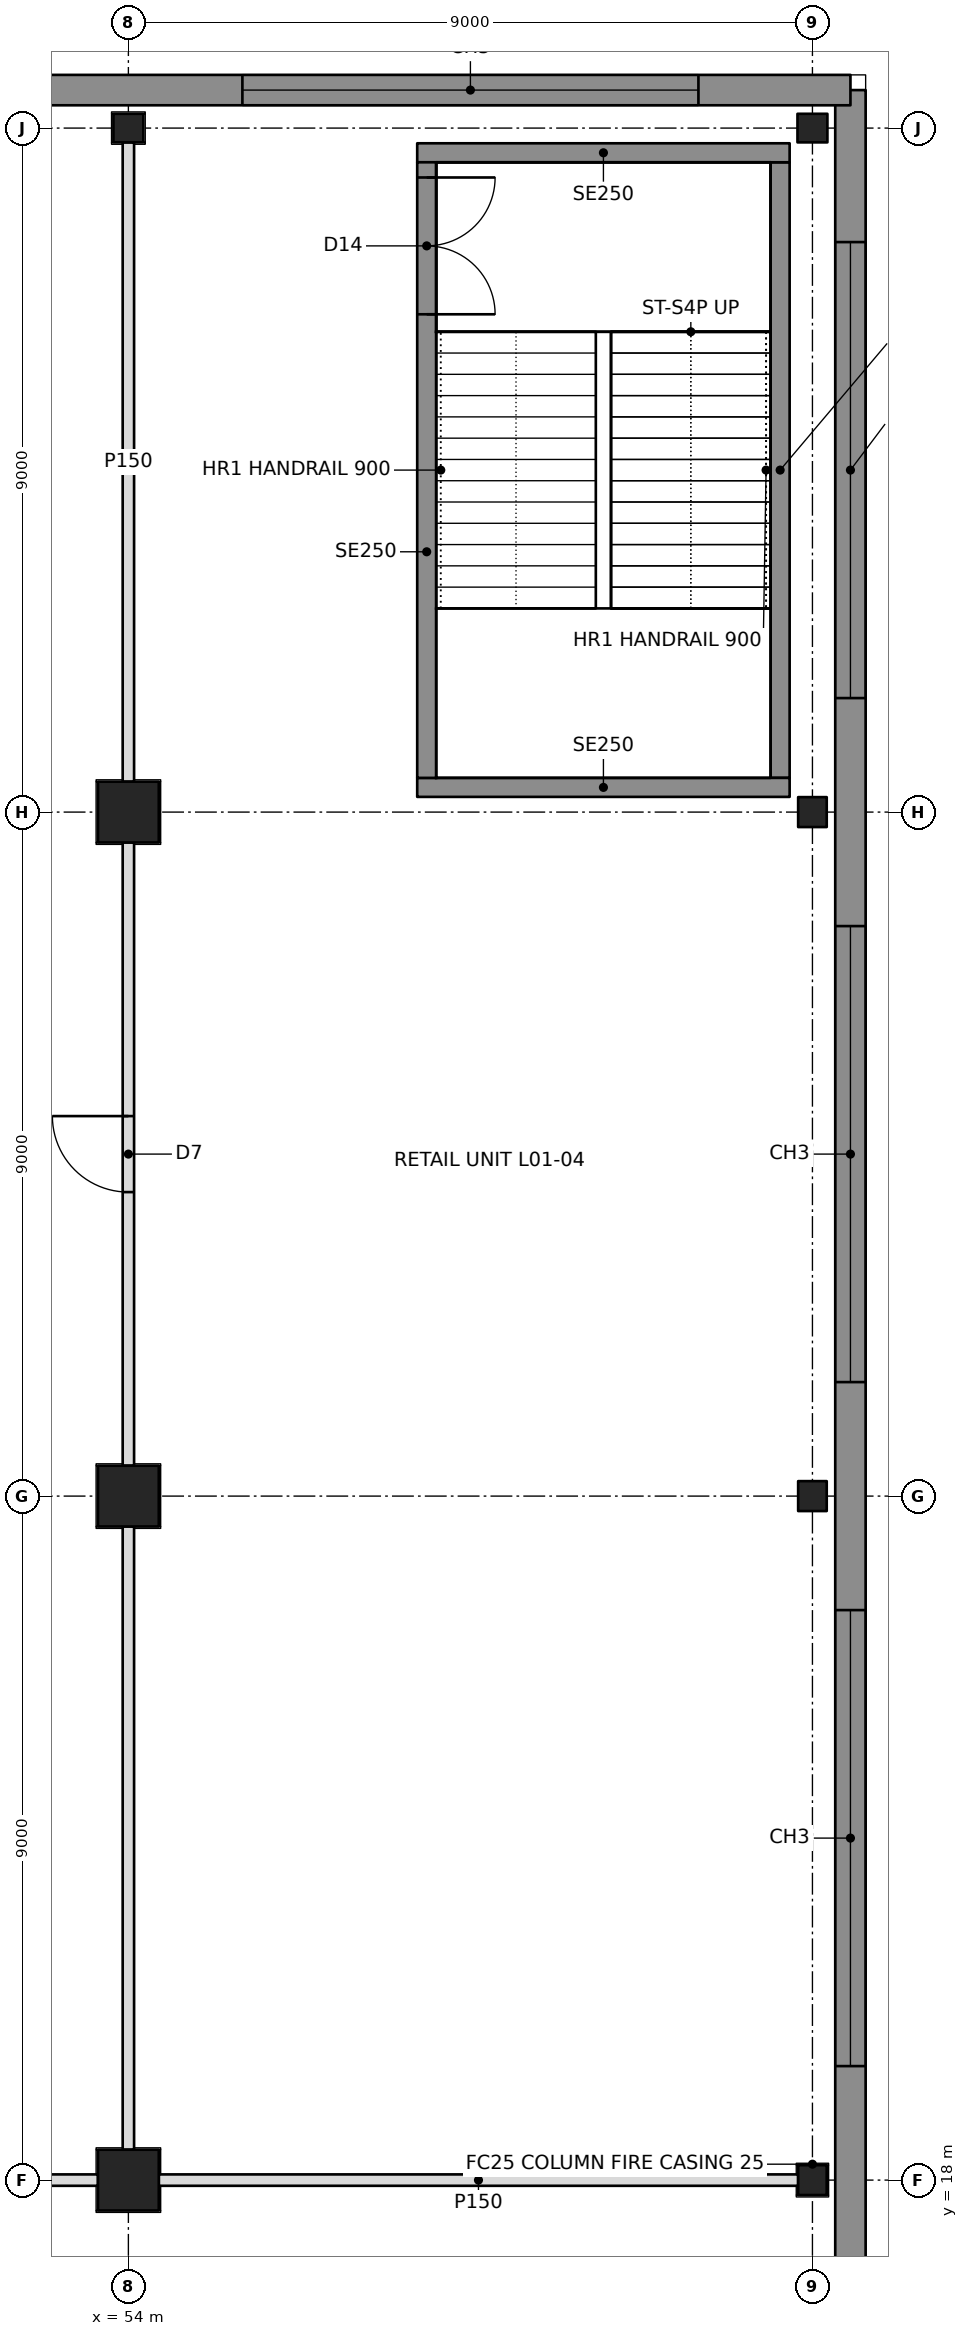
"""IFC4 building model, lengths in metres.
Left out: names, types, materials, properties, quantities, classifications, styles, units other than length and angle.
Written with IfcOpenShell. Run it as: python <this file> out.ifc"""

import sys

from ifc_helpers import new_model, si_unit, direction, frame, frame_2d, origin, origin_2d, place, context, subcontext, project, spatial, rectangle, hollow_rectangle, i_section, extrude, element, fill, save


model = new_model("IFC4")
c1 = context("Model", 3, precision=1e-05, world=origin(), true_north=direction((0.0, 1.0)))
c2 = subcontext(c1, "Body", "Model", "MODEL_VIEW")
j1 = project(units=[si_unit("LENGTHUNIT", "METRE"), si_unit("PLANEANGLEUNIT", "RADIAN")], contexts=[c1])
p1 = place(None, origin())
s1 = spatial("IfcSite", under=j1, at=p1, CompositionType="ELEMENT")
p2 = place(p1, origin())
s2 = spatial("IfcBuilding", under=s1, at=p2, CompositionType="ELEMENT")
p3 = place(p2, frame((0.0, 0.0, 6.0)))
s3 = spatial("IfcBuildingStorey", under=s2, at=p3, CompositionType="ELEMENT", Elevation=6.0)
for number, where, z_axis, x_axis in (
    (1, (54.0, 18.0, 0.0), (0.0, 0.0, 1.0), (0.0, 1.0, 0.0)),
    (2, (54.0, 27.0, 0.0), (0.0, 0.0, 1.0), (0.0, 1.0, 0.0)),
    (3, (54.0, 36.0, 0.0), (0.0, 0.0, 1.0), (1.0, 0.0, 0.0)),
):
    element("IfcColumn", number, at=place(p3, frame(where, z_axis=z_axis, x_axis=x_axis)), inside=s3, PredefinedType="COLUMN", context=c2, shape_type="SweptSolid", body=[
        extrude(hollow_rectangle(XDim=0.8, YDim=0.8, WallThickness=0.1, at=origin_2d()), origin(), (0.0, 0.0, 1.0), 5.0),
    ])
for number, where, z_axis, x_axis in (
    (4, (54.0, 45.0, 0.0), (0.0, 0.0, 1.0), (1.0, 0.0, 0.0)),
    (5, (63.0, 18.0, 0.0), (0.0, 0.0, 1.0), (0.0, 1.0, 0.0)),
    (6, (63.0, 27.0, 0.0), (0.0, 0.0, 1.0), (0.0, 1.0, 0.0)),
    (7, (63.0, 36.0, 0.0), (0.0, 0.0, 1.0), (0.0, 1.0, 0.0)),
    (8, (63.0, 45.0, 0.0), (0.0, 0.0, 1.0), (1.0, 0.0, 0.0)),
):
    element("IfcColumn", number, at=place(p3, frame(where, z_axis=z_axis, x_axis=x_axis)), inside=s3, PredefinedType="COLUMN", context=c2, shape_type="SweptSolid", body=[
        extrude(i_section(OverallWidth=0.394, OverallDepth=0.376, WebThickness=0.017, FlangeThickness=0.028, at=origin_2d()), origin(), (0.0, 0.0, 1.0), 5.0),
    ])
p4 = place(p3, frame((63.5, -27.5, 0.0), z_axis=(0.0, 0.0, 1.0), x_axis=(0.0, 1.0, 0.0)))
e9 = element("IfcWall", 9, at=p4, inside=s3, PredefinedType="SOLIDWALL", context=c2, shape_type="SweptSolid", body=[
    extrude(rectangle(XDim=73.0, YDim=0.4, at=frame_2d((36.5, 0.0))), origin(), (0.0, 0.0, 1.0), 4.75),
])
p5 = place(p4, frame((2.0, 0.0, 0.9)))
e10 = element("IfcOpeningElement", 10, at=p5, cuts=e9, PredefinedType="OPENING", context=c2, shape_type="SweptSolid", body=[
    extrude(rectangle(XDim=6.0, YDim=2.6, at=frame_2d((3.0, 1.3))), frame((0.0, 0.21, 0.0), z_axis=(0.0, -1.0, 0.0), x_axis=(1.0, 0.0, 0.0)), (0.0, 0.0, 1.0), 0.42),
])
p6 = place(p4, frame((11.0, 0.0, 0.9)))
e11 = element("IfcOpeningElement", 11, at=p6, cuts=e9, PredefinedType="OPENING", context=c2, shape_type="SweptSolid", body=[
    extrude(rectangle(XDim=6.0, YDim=2.6, at=frame_2d((3.0, 1.3))), frame((0.0, 0.21, 0.0), z_axis=(0.0, -1.0, 0.0), x_axis=(1.0, 0.0, 0.0)), (0.0, 0.0, 1.0), 0.42),
])
p7 = place(p4, frame((20.0, 0.0, 0.9)))
e12 = element("IfcOpeningElement", 12, at=p7, cuts=e9, PredefinedType="OPENING", context=c2, shape_type="SweptSolid", body=[
    extrude(rectangle(XDim=6.0, YDim=2.6, at=frame_2d((3.0, 1.3))), frame((0.0, 0.21, 0.0), z_axis=(0.0, -1.0, 0.0), x_axis=(1.0, 0.0, 0.0)), (0.0, 0.0, 1.0), 0.42),
])
p8 = place(p4, frame((29.0, 0.0, 0.9)))
e13 = element("IfcOpeningElement", 13, at=p8, cuts=e9, PredefinedType="OPENING", context=c2, shape_type="SweptSolid", body=[
    extrude(rectangle(XDim=6.0, YDim=2.6, at=frame_2d((3.0, 1.3))), frame((0.0, 0.21, 0.0), z_axis=(0.0, -1.0, 0.0), x_axis=(1.0, 0.0, 0.0)), (0.0, 0.0, 1.0), 0.42),
])
p9 = place(p4, frame((38.0, 0.0, 0.9)))
e14 = element("IfcOpeningElement", 14, at=p9, cuts=e9, PredefinedType="OPENING", context=c2, shape_type="SweptSolid", body=[
    extrude(rectangle(XDim=6.0, YDim=2.6, at=frame_2d((3.0, 1.3))), frame((0.0, 0.21, 0.0), z_axis=(0.0, -1.0, 0.0), x_axis=(1.0, 0.0, 0.0)), (0.0, 0.0, 1.0), 0.42),
])
p10 = place(p4, frame((47.0, 0.0, 0.9)))
e15 = element("IfcOpeningElement", 15, at=p10, cuts=e9, PredefinedType="OPENING", context=c2, shape_type="SweptSolid", body=[
    extrude(rectangle(XDim=6.0, YDim=2.6, at=frame_2d((3.0, 1.3))), frame((0.0, 0.21, 0.0), z_axis=(0.0, -1.0, 0.0), x_axis=(1.0, 0.0, 0.0)), (0.0, 0.0, 1.0), 0.42),
])
p11 = place(p4, frame((56.0, 0.0, 0.9)))
e16 = element("IfcOpeningElement", 16, at=p11, cuts=e9, PredefinedType="OPENING", context=c2, shape_type="SweptSolid", body=[
    extrude(rectangle(XDim=6.0, YDim=2.6, at=frame_2d((3.0, 1.3))), frame((0.0, 0.21, 0.0), z_axis=(0.0, -1.0, 0.0), x_axis=(1.0, 0.0, 0.0)), (0.0, 0.0, 1.0), 0.42),
])
p12 = place(p4, frame((65.0, 0.0, 0.9)))
e17 = element("IfcOpeningElement", 17, at=p12, cuts=e9, PredefinedType="OPENING", context=c2, shape_type="SweptSolid", body=[
    extrude(rectangle(XDim=6.0, YDim=2.6, at=frame_2d((3.0, 1.3))), frame((0.0, 0.21, 0.0), z_axis=(0.0, -1.0, 0.0), x_axis=(1.0, 0.0, 0.0)), (0.0, 0.0, 1.0), 0.42),
])
p13 = place(p3, frame((63.5, 45.5, 0.0), z_axis=(0.0, 0.0, 1.0), x_axis=(-1.0, 0.0, 0.0)))
e18 = element("IfcWall", 18, at=p13, inside=s3, PredefinedType="SOLIDWALL", context=c2, shape_type="SweptSolid", body=[
    extrude(rectangle(XDim=73.0, YDim=0.4, at=frame_2d((36.5, 0.0))), origin(), (0.0, 0.0, 1.0), 4.75),
])
p14 = place(p13, frame((2.0, 0.0, 0.9)))
e19 = element("IfcOpeningElement", 19, at=p14, cuts=e18, PredefinedType="OPENING", context=c2, shape_type="SweptSolid", body=[
    extrude(rectangle(XDim=6.0, YDim=2.6, at=frame_2d((3.0, 1.3))), frame((0.0, 0.21, 0.0), z_axis=(0.0, -1.0, 0.0), x_axis=(1.0, 0.0, 0.0)), (0.0, 0.0, 1.0), 0.42),
])
p15 = place(p13, frame((11.0, 0.0, 0.9)))
e20 = element("IfcOpeningElement", 20, at=p15, cuts=e18, PredefinedType="OPENING", context=c2, shape_type="SweptSolid", body=[
    extrude(rectangle(XDim=6.0, YDim=2.6, at=frame_2d((3.0, 1.3))), frame((0.0, 0.21, 0.0), z_axis=(0.0, -1.0, 0.0), x_axis=(1.0, 0.0, 0.0)), (0.0, 0.0, 1.0), 0.42),
])
p16 = place(p13, frame((20.0, 0.0, 0.9)))
e21 = element("IfcOpeningElement", 21, at=p16, cuts=e18, PredefinedType="OPENING", context=c2, shape_type="SweptSolid", body=[
    extrude(rectangle(XDim=6.0, YDim=2.6, at=frame_2d((3.0, 1.3))), frame((0.0, 0.21, 0.0), z_axis=(0.0, -1.0, 0.0), x_axis=(1.0, 0.0, 0.0)), (0.0, 0.0, 1.0), 0.42),
])
p17 = place(p13, frame((29.0, 0.0, 0.9)))
e22 = element("IfcOpeningElement", 22, at=p17, cuts=e18, PredefinedType="OPENING", context=c2, shape_type="SweptSolid", body=[
    extrude(rectangle(XDim=6.0, YDim=2.6, at=frame_2d((3.0, 1.3))), frame((0.0, 0.21, 0.0), z_axis=(0.0, -1.0, 0.0), x_axis=(1.0, 0.0, 0.0)), (0.0, 0.0, 1.0), 0.42),
])
p18 = place(p13, frame((38.0, 0.0, 0.9)))
e23 = element("IfcOpeningElement", 23, at=p18, cuts=e18, PredefinedType="OPENING", context=c2, shape_type="SweptSolid", body=[
    extrude(rectangle(XDim=6.0, YDim=2.6, at=frame_2d((3.0, 1.3))), frame((0.0, 0.21, 0.0), z_axis=(0.0, -1.0, 0.0), x_axis=(1.0, 0.0, 0.0)), (0.0, 0.0, 1.0), 0.42),
])
p19 = place(p13, frame((47.0, 0.0, 0.9)))
e24 = element("IfcOpeningElement", 24, at=p19, cuts=e18, PredefinedType="OPENING", context=c2, shape_type="SweptSolid", body=[
    extrude(rectangle(XDim=6.0, YDim=2.6, at=frame_2d((3.0, 1.3))), frame((0.0, 0.21, 0.0), z_axis=(0.0, -1.0, 0.0), x_axis=(1.0, 0.0, 0.0)), (0.0, 0.0, 1.0), 0.42),
])
p20 = place(p13, frame((56.0, 0.0, 0.9)))
e25 = element("IfcOpeningElement", 25, at=p20, cuts=e18, PredefinedType="OPENING", context=c2, shape_type="SweptSolid", body=[
    extrude(rectangle(XDim=6.0, YDim=2.6, at=frame_2d((3.0, 1.3))), frame((0.0, 0.21, 0.0), z_axis=(0.0, -1.0, 0.0), x_axis=(1.0, 0.0, 0.0)), (0.0, 0.0, 1.0), 0.42),
])
p21 = place(p13, frame((65.0, 0.0, 0.9)))
e26 = element("IfcOpeningElement", 26, at=p21, cuts=e18, PredefinedType="OPENING", context=c2, shape_type="SweptSolid", body=[
    extrude(rectangle(XDim=6.0, YDim=2.6, at=frame_2d((3.0, 1.3))), frame((0.0, 0.21, 0.0), z_axis=(0.0, -1.0, 0.0), x_axis=(1.0, 0.0, 0.0)), (0.0, 0.0, 1.0), 0.42),
])
p22 = place(p3, frame((49.5, 18.0, 0.0), z_axis=(0.0, 0.0, 1.0), x_axis=(1.0, 0.0, 0.0)))
e27 = element("IfcWall", 27, at=p22, inside=s3, PredefinedType="PARTITIONING", context=c2, shape_type="SweptSolid", body=[
    extrude(rectangle(XDim=4.1, YDim=0.15, at=frame_2d((2.05, 0.0))), origin(), (0.0, 0.0, 1.0), 3.892),
])
p23 = place(p3, frame((54.4, 18.0, 0.0), z_axis=(0.0, 0.0, 1.0), x_axis=(1.0, 0.0, 0.0)))
e28 = element("IfcWall", 28, at=p23, inside=s3, PredefinedType="PARTITIONING", context=c2, shape_type="SweptSolid", body=[
    extrude(rectangle(XDim=8.412, YDim=0.15, at=frame_2d((4.206, 0.0))), origin(), (0.0, 0.0, 1.0), 3.892),
])
p24 = place(p3, frame((54.0, 18.4, 0.0), z_axis=(0.0, 0.0, 1.0), x_axis=(0.0, 1.0, 0.0)))
e29 = element("IfcWall", 29, at=p24, inside=s3, PredefinedType="PARTITIONING", context=c2, shape_type="SweptSolid", body=[
    extrude(rectangle(XDim=8.2, YDim=0.15, at=frame_2d((4.1, 0.0))), origin(), (0.0, 0.0, 1.0), 3.892),
])
p25 = place(p3, frame((54.0, 27.4, 0.0), z_axis=(0.0, 0.0, 1.0), x_axis=(0.0, 1.0, 0.0)))
e30 = element("IfcWall", 30, at=p25, inside=s3, PredefinedType="PARTITIONING", context=c2, shape_type="SweptSolid", body=[
    extrude(rectangle(XDim=8.2, YDim=0.15, at=frame_2d((4.1, 0.0))), origin(), (0.0, 0.0, 1.0), 3.892),
])
p26 = place(p25, frame((3.6, 0.0, 0.0)))
e31 = element("IfcOpeningElement", 31, at=p26, cuts=e30, PredefinedType="OPENING", context=c2, shape_type="SweptSolid", body=[
    extrude(rectangle(XDim=1.0, YDim=2.1, at=frame_2d((0.5, 1.05))), frame((0.0, 0.085, 0.0), z_axis=(0.0, -1.0, 0.0), x_axis=(1.0, 0.0, 0.0)), (0.0, 0.0, 1.0), 0.17),
])
p27 = place(p3, frame((54.0, 36.4, 0.0), z_axis=(0.0, 0.0, 1.0), x_axis=(0.0, 1.0, 0.0)))
e32 = element("IfcWall", 32, at=p27, inside=s3, PredefinedType="PARTITIONING", context=c2, shape_type="SweptSolid", body=[
    extrude(rectangle(XDim=8.412, YDim=0.15, at=frame_2d((4.206, 0.0))), origin(), (0.0, 0.0, 1.0), 3.892),
])
for number, where, z_axis, x_axis in (
    (33, (57.8, 36.325, 0.0), (0.0, 0.0, 1.0), (1.0, 0.0, 0.0)),
    (34, (57.8, 44.675, 0.0), (0.0, 0.0, 1.0), (1.0, 0.0, 0.0)),
):
    element("IfcWall", number, at=place(p3, frame(where, z_axis=z_axis, x_axis=x_axis)), inside=s3, PredefinedType="SOLIDWALL", context=c2, shape_type="SweptSolid", body=[
        extrude(rectangle(XDim=4.9, YDim=0.25, at=frame_2d((2.45, 0.0))), origin(), (0.0, 0.0, 1.0), 4.75),
    ])
p28 = place(p3, frame((57.925, 36.45, 0.0), z_axis=(0.0, 0.0, 1.0), x_axis=(0.0, 1.0, 0.0)))
e35 = element("IfcWall", 35, at=p28, inside=s3, PredefinedType="SOLIDWALL", context=c2, shape_type="SweptSolid", body=[
    extrude(rectangle(XDim=8.1, YDim=0.25, at=frame_2d((4.05, 0.0))), origin(), (0.0, 0.0, 1.0), 4.75),
])
p29 = place(p28, frame((6.1, 0.0, 0.0)))
e36 = element("IfcOpeningElement", 36, at=p29, cuts=e35, PredefinedType="OPENING", context=c2, shape_type="SweptSolid", body=[
    extrude(rectangle(XDim=1.8, YDim=2.1, at=frame_2d((0.9, 1.05))), frame((0.0, 0.135, 0.0), z_axis=(0.0, -1.0, 0.0), x_axis=(1.0, 0.0, 0.0)), (0.0, 0.0, 1.0), 0.27),
])
p30 = place(p3, frame((62.575, 36.45, 0.0), z_axis=(0.0, 0.0, 1.0), x_axis=(0.0, 1.0, 0.0)))
e37 = element("IfcWall", 37, at=p30, inside=s3, PredefinedType="SOLIDWALL", context=c2, shape_type="SweptSolid", body=[
    extrude(rectangle(XDim=8.1, YDim=0.25, at=frame_2d((4.05, 0.0))), origin(), (0.0, 0.0, 1.0), 4.75),
])
p31 = place(p10, origin())
e38 = element("IfcWindow", 38, at=p31, inside=s3, PartitioningType="TRIPLE_PANEL_VERTICAL", PredefinedType="WINDOW", context=c2, shape_type="SweptSolid", body=[
    extrude(rectangle(XDim=6.0, YDim=2.6, at=frame_2d((3.0, 1.3))), frame((0.0, 0.03, 0.0), z_axis=(0.0, -1.0, 0.0), x_axis=(1.0, 0.0, 0.0)), (0.0, 0.0, 1.0), 0.06),
])
fill(e15, e38)
p32 = place(p11, origin())
e39 = element("IfcWindow", 39, at=p32, inside=s3, PartitioningType="TRIPLE_PANEL_VERTICAL", PredefinedType="WINDOW", context=c2, shape_type="SweptSolid", body=[
    extrude(rectangle(XDim=6.0, YDim=2.6, at=frame_2d((3.0, 1.3))), frame((0.0, 0.03, 0.0), z_axis=(0.0, -1.0, 0.0), x_axis=(1.0, 0.0, 0.0)), (0.0, 0.0, 1.0), 0.06),
])
fill(e16, e39)
p33 = place(p12, origin())
e40 = element("IfcWindow", 40, at=p33, inside=s3, PartitioningType="TRIPLE_PANEL_VERTICAL", PredefinedType="WINDOW", context=c2, shape_type="SweptSolid", body=[
    extrude(rectangle(XDim=6.0, YDim=2.6, at=frame_2d((3.0, 1.3))), frame((0.0, 0.03, 0.0), z_axis=(0.0, -1.0, 0.0), x_axis=(1.0, 0.0, 0.0)), (0.0, 0.0, 1.0), 0.06),
])
fill(e17, e40)
p34 = place(p14, origin())
e41 = element("IfcWindow", 41, at=p34, inside=s3, PartitioningType="TRIPLE_PANEL_VERTICAL", PredefinedType="WINDOW", context=c2, shape_type="SweptSolid", body=[
    extrude(rectangle(XDim=6.0, YDim=2.6, at=frame_2d((3.0, 1.3))), frame((0.0, 0.03, 0.0), z_axis=(0.0, -1.0, 0.0), x_axis=(1.0, 0.0, 0.0)), (0.0, 0.0, 1.0), 0.06),
])
fill(e19, e41)
p35 = place(p26, origin())
e42 = element("IfcDoor", 42, at=p35, inside=s3, OperationType="SINGLE_SWING_RIGHT", PredefinedType="DOOR", context=c2, shape_type="SweptSolid", body=[
    extrude(rectangle(XDim=1.0, YDim=2.1, at=frame_2d((0.5, 1.05))), frame((0.0, 0.025, 0.0), z_axis=(0.0, -1.0, 0.0), x_axis=(1.0, 0.0, 0.0)), (0.0, 0.0, 1.0), 0.05),
])
fill(e31, e42)
p36 = place(p29, frame((1.8, 0.0, 0.0), z_axis=(0.0, 0.0, 1.0), x_axis=(-1.0, 0.0, 0.0)))
e43 = element("IfcDoor", 43, at=p36, inside=s3, OperationType="DOUBLE_DOOR_SINGLE_SWING", PredefinedType="DOOR", context=c2, shape_type="SweptSolid", body=[
    extrude(rectangle(XDim=1.8, YDim=2.1, at=frame_2d((0.9, 1.05))), frame((0.0, 0.025, 0.0), z_axis=(0.0, -1.0, 0.0), x_axis=(1.0, 0.0, 0.0)), (0.0, 0.0, 1.0), 0.05),
])
fill(e36, e43)
save(model, sys.argv[1])
